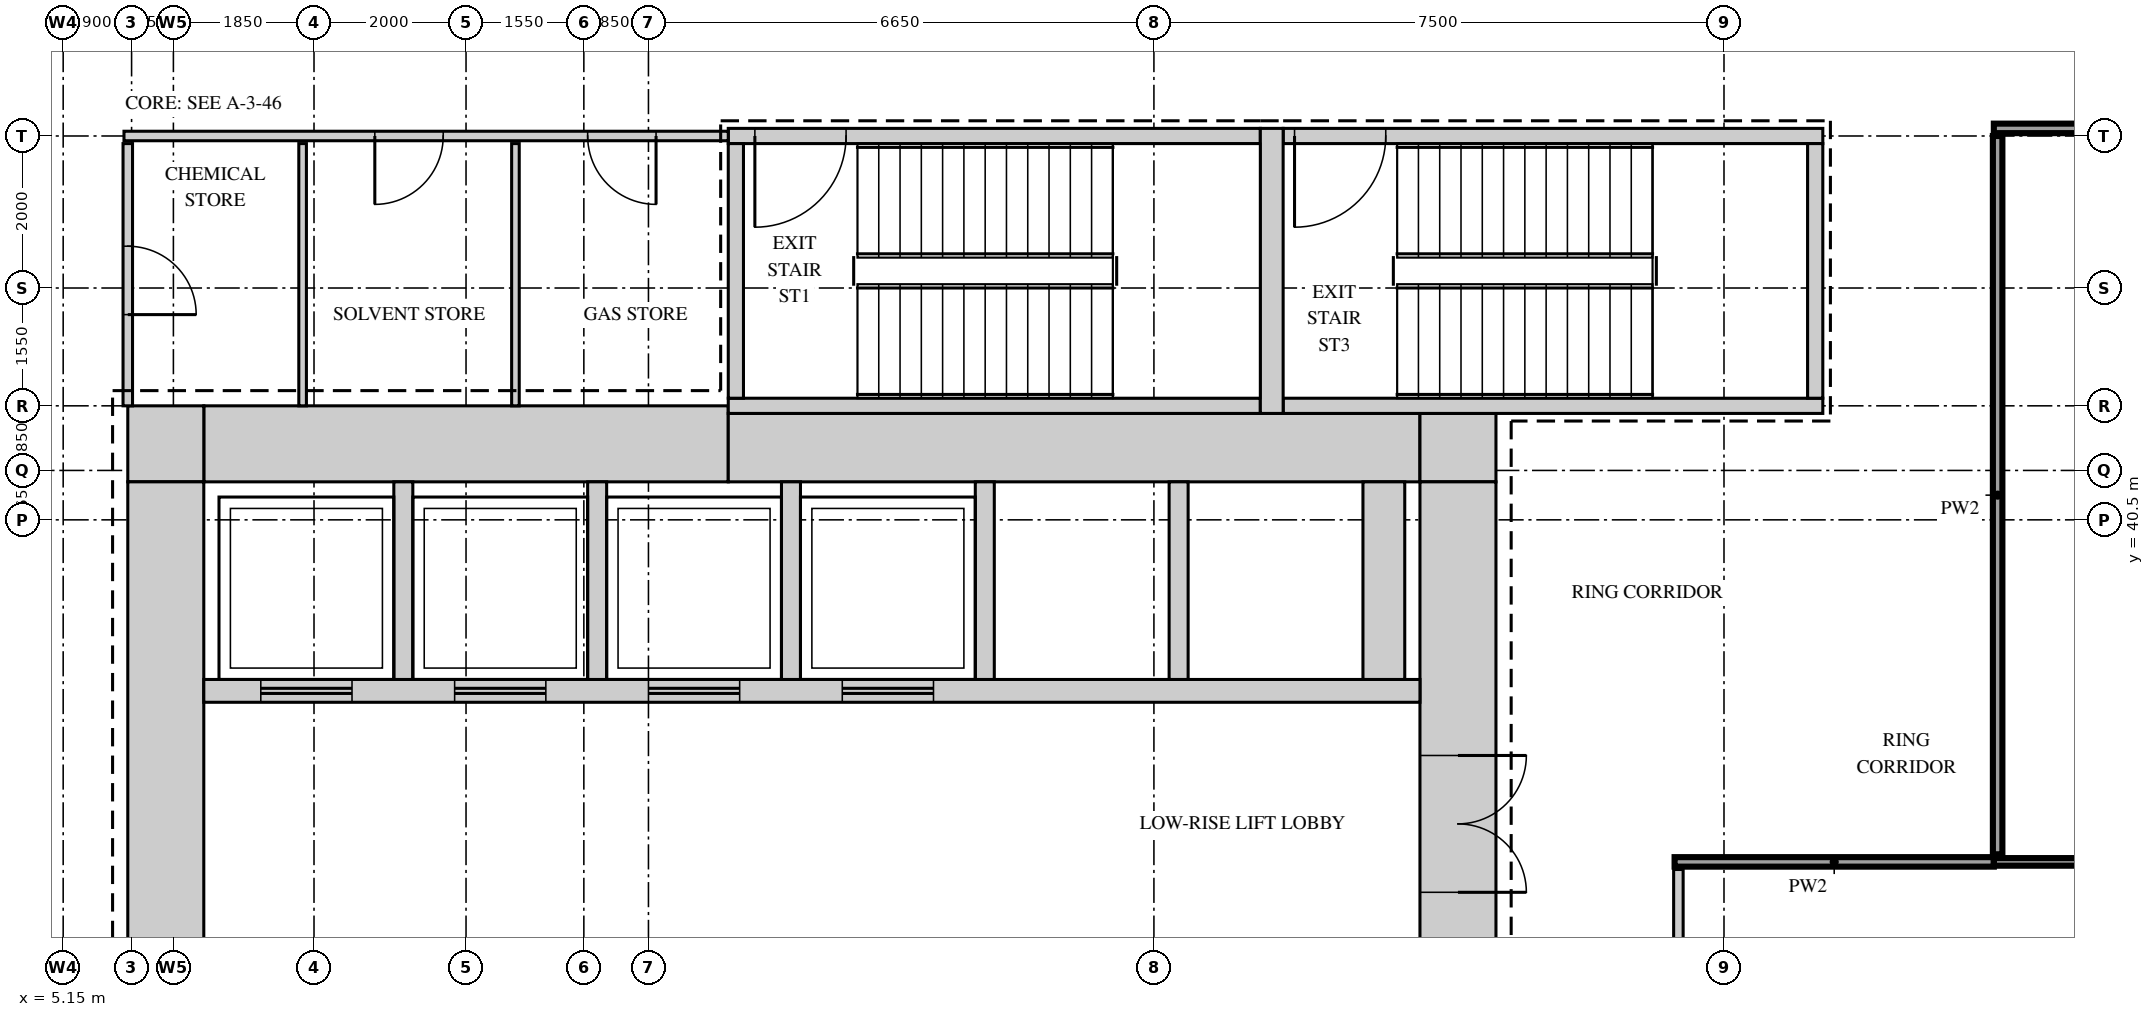
"""IFC4 building model, lengths in metres.
Left out: names, types, materials, properties, quantities, classifications, styles, units other than length and angle.
Written with IfcOpenShell. Run it as: python <this file> out.ifc"""

import sys

from ifc_helpers import new_model, si_unit, direction, frame, frame_2d, origin, place, context, subcontext, project, spatial, rectangle, extrude, source, transform, mapped, element, fill, save


model = new_model("IFC4")
c1 = context("Model", 3, precision=1e-05, world=origin(), true_north=direction((0.0, 1.0)))
c2 = subcontext(c1, "Body", "Model", "MODEL_VIEW")
j1 = project(units=[si_unit("LENGTHUNIT", "METRE"), si_unit("PLANEANGLEUNIT", "RADIAN")], contexts=[c1])
p1 = place(None, origin())
s1 = spatial("IfcSite", under=j1, at=p1, CompositionType="ELEMENT")
p2 = place(p1, origin())
s2 = spatial("IfcBuilding", under=s1, at=p2, CompositionType="ELEMENT")
p3 = place(p2, frame((0.0, 0.0, 145.5)))
s3 = spatial("IfcBuildingStorey", under=s2, at=p3, CompositionType="ELEMENT", Elevation=145.5)
m1 = source(origin(), c2, "Body", "SweptSolid", [
    extrude(rectangle(XDim=6.9, YDim=1.0, at=frame_2d((3.45, 0.0))), origin(), (0.0, 0.0, 1.0), 4.1),
])
p4 = place(p3, frame((7.0, 41.5, 0.0), z_axis=(0.0, 0.0, 1.0), x_axis=(1.0, 0.0, 0.0)))
e1 = element("IfcWall", 1, at=p4, inside=s3, PredefinedType="SHEAR", context=c2, shape_type="MappedRepresentation", body=[
    mapped(m1, transform((0.0, 0.0, 0.0))),
])
m2 = source(origin(), c2, "Body", "SweptSolid", [
    extrude(rectangle(XDim=9.1, YDim=0.9, at=frame_2d((4.55, 0.0))), origin(), (0.0, 0.0, 1.0), 4.1),
])
p5 = place(p3, frame((13.9, 41.45, 0.0), z_axis=(0.0, 0.0, 1.0), x_axis=(1.0, 0.0, 0.0)))
e2 = element("IfcWall", 2, at=p5, inside=s3, PredefinedType="SHEAR", context=c2, shape_type="MappedRepresentation", body=[
    mapped(m2, transform((0.0, 0.0, 0.0))),
])
m3 = source(origin(), c2, "Body", "SweptSolid", [
    extrude(rectangle(XDim=1.0, YDim=0.9, at=frame_2d((0.5, 0.0))), origin(), (0.0, 0.0, 1.0), 4.1),
])
p6 = place(p3, frame((23.0, 41.45, 0.0), z_axis=(0.0, 0.0, 1.0), x_axis=(1.0, 0.0, 0.0)))
e3 = element("IfcWall", 3, at=p6, inside=s3, PredefinedType="SHEAR", context=c2, shape_type="MappedRepresentation", body=[
    mapped(m3, transform((0.0, 0.0, 0.0))),
])
m4 = source(origin(), c2, "Body", "SweptSolid", [
    extrude(rectangle(XDim=1.0, YDim=1.0, at=frame_2d((0.5, 0.0))), origin(), (0.0, 0.0, 1.0), 4.1),
])
p7 = place(p3, frame((6.0, 41.5, 0.0), z_axis=(0.0, 0.0, 1.0), x_axis=(1.0, 0.0, 0.0)))
e4 = element("IfcWall", 4, at=p7, inside=s3, PredefinedType="SHEAR", context=c2, shape_type="MappedRepresentation", body=[
    mapped(m4, transform((0.0, 0.0, 0.0))),
])
m5 = source(origin(), c2, "Body", "SweptSolid", [
    extrude(rectangle(XDim=28.0, YDim=1.0, at=frame_2d((14.0, 0.0))), origin(), (0.0, 0.0, 1.0), 4.1),
])
p8 = place(p3, frame((23.5, 13.0, 0.0), z_axis=(0.0, 0.0, 1.0), x_axis=(0.0, 1.0, 0.0)))
e5 = element("IfcWall", 5, at=p8, inside=s3, PredefinedType="SHEAR", context=c2, shape_type="MappedRepresentation", body=[
    mapped(m5, transform((0.0, 0.0, 0.0))),
])
m6 = source(origin(), c2, "Body", "SweptSolid", [
    extrude(rectangle(XDim=1.8, YDim=2.1, at=frame_2d((0.9, 1.05))), frame((0.0, 0.51, 0.0), z_axis=(0.0, -1.0, 0.0), x_axis=(1.0, 0.0, 0.0)), (0.0, 0.0, 1.0), 1.02),
])
p9 = place(p8, frame((22.6, 0.0, 0.0)))
e6 = element("IfcOpeningElement", 6, at=p9, cuts=e5, PredefinedType="OPENING", context=c2, shape_type="MappedRepresentation", body=[
    mapped(m6, transform((0.0, 0.0, 0.0))),
])
m7 = source(origin(), c2, "Body", "SweptSolid", [
    extrude(rectangle(XDim=1.2, YDim=2.1, at=frame_2d((0.6, 1.05))), frame((0.0, 0.51, 0.0), z_axis=(0.0, -1.0, 0.0), x_axis=(1.0, 0.0, 0.0)), (0.0, 0.0, 1.0), 1.02),
])
p10 = place(p8, frame((12.35, 0.0, 0.0)))
e7 = element("IfcOpeningElement", 7, at=p10, cuts=e5, PredefinedType="OPENING", context=c2, shape_type="MappedRepresentation", body=[
    mapped(m7, transform((0.0, 0.0, 0.0))),
])
m8 = source(origin(), c2, "Body", "SweptSolid", [
    extrude(rectangle(XDim=0.9, YDim=2.1, at=frame_2d((0.45, 1.05))), frame((0.0, 0.51, 0.0), z_axis=(0.0, -1.0, 0.0), x_axis=(1.0, 0.0, 0.0)), (0.0, 0.0, 1.0), 1.02),
])
p11 = place(p8, frame((4.6, 0.0, 0.0)))
e8 = element("IfcOpeningElement", 8, at=p11, cuts=e5, PredefinedType="OPENING", context=c2, shape_type="MappedRepresentation", body=[
    mapped(m8, transform((0.0, 0.0, 0.0))),
])
p12 = place(p3, frame((6.5, 13.0, 0.0), z_axis=(0.0, 0.0, 1.0), x_axis=(0.0, 1.0, 0.0)))
e9 = element("IfcWall", 9, at=p12, inside=s3, PredefinedType="SHEAR", context=c2, shape_type="MappedRepresentation", body=[
    mapped(m5, transform((0.0, 0.0, 0.0))),
])
m9 = source(origin(), c2, "Body", "SweptSolid", [
    extrude(rectangle(XDim=7.0, YDim=0.2, at=frame_2d((3.5, 0.0))), origin(), (0.0, 0.0, 1.0), 4.1),
])
p13 = place(p3, frame((13.9, 45.55, 0.0), z_axis=(0.0, 0.0, 1.0), x_axis=(1.0, 0.0, 0.0)))
e10 = element("IfcWall", 10, at=p13, inside=s3, PredefinedType="SHEAR", context=c2, shape_type="MappedRepresentation", body=[
    mapped(m9, transform((0.0, 0.0, 0.0))),
])
m10 = source(origin(), c2, "Body", "SweptSolid", [
    extrude(rectangle(XDim=1.2, YDim=2.1, at=frame_2d((0.6, 1.05))), frame((0.0, 0.11, 0.0), z_axis=(0.0, -1.0, 0.0), x_axis=(1.0, 0.0, 0.0)), (0.0, 0.0, 1.0), 0.22),
])
p14 = place(p13, frame((0.35, 0.0, 0.0)))
e11 = element("IfcOpeningElement", 11, at=p14, cuts=e10, PredefinedType="OPENING", context=c2, shape_type="MappedRepresentation", body=[
    mapped(m10, transform((0.0, 0.0, 0.0))),
])
p15 = place(p3, frame((13.9, 42.0, 0.0), z_axis=(0.0, 0.0, 1.0), x_axis=(1.0, 0.0, 0.0)))
e12 = element("IfcWall", 12, at=p15, inside=s3, PredefinedType="SHEAR", context=c2, shape_type="MappedRepresentation", body=[
    mapped(m9, transform((0.0, 0.0, 0.0))),
])
m11 = source(origin(), c2, "Body", "SweptSolid", [
    extrude(rectangle(XDim=7.1, YDim=0.2, at=frame_2d((3.55, 0.0))), origin(), (0.0, 0.0, 1.0), 4.1),
])
p16 = place(p3, frame((21.2, 45.55, 0.0), z_axis=(0.0, 0.0, 1.0), x_axis=(1.0, 0.0, 0.0)))
e13 = element("IfcWall", 13, at=p16, inside=s3, PredefinedType="SHEAR", context=c2, shape_type="MappedRepresentation", body=[
    mapped(m11, transform((0.0, 0.0, 0.0))),
])
p17 = place(p16, frame((0.15, 0.0, 0.0)))
e14 = element("IfcOpeningElement", 14, at=p17, cuts=e13, PredefinedType="OPENING", context=c2, shape_type="MappedRepresentation", body=[
    mapped(m10, transform((0.0, 0.0, 0.0))),
])
p18 = place(p3, frame((21.2, 42.0, 0.0), z_axis=(0.0, 0.0, 1.0), x_axis=(1.0, 0.0, 0.0)))
e15 = element("IfcWall", 15, at=p18, inside=s3, PredefinedType="SHEAR", context=c2, shape_type="MappedRepresentation", body=[
    mapped(m11, transform((0.0, 0.0, 0.0))),
])
m12 = source(origin(), c2, "Body", "SweptSolid", [
    extrude(rectangle(XDim=3.75, YDim=0.3, at=frame_2d((1.875, 0.0))), origin(), (0.0, 0.0, 1.0), 4.1),
])
p19 = place(p3, frame((21.05, 41.9, 0.0), z_axis=(0.0, 0.0, 1.0), x_axis=(0.0, 1.0, 0.0)))
e16 = element("IfcWall", 16, at=p19, inside=s3, PredefinedType="SHEAR", context=c2, shape_type="MappedRepresentation", body=[
    mapped(m12, transform((0.0, 0.0, 0.0))),
])
m13 = source(origin(), c2, "Body", "SweptSolid", [
    extrude(rectangle(XDim=3.35, YDim=0.2, at=frame_2d((1.675, 0.0))), origin(), (0.0, 0.0, 1.0), 4.1),
])
for number, where, z_axis, x_axis in (
    (17, (14.0, 42.1, 0.0), (0.0, 0.0, 1.0), (0.0, 1.0, 0.0)),
    (18, (28.2, 42.1, 0.0), (0.0, 0.0, 1.0), (0.0, 1.0, 0.0)),
):
    element("IfcWall", number, at=place(p3, frame(where, z_axis=z_axis, x_axis=x_axis)), inside=s3, PredefinedType="SHEAR", context=c2, shape_type="MappedRepresentation", body=[
        mapped(m13, transform((0.0, 0.0, 0.0))),
    ])
m14 = source(origin(), c2, "Body", "SweptSolid", [
    extrude(rectangle(XDim=16.0, YDim=0.3, at=frame_2d((8.0, 0.0))), origin(), (0.0, 0.0, 1.0), 4.1),
])
p20 = place(p3, frame((7.0, 38.25, 0.0), z_axis=(0.0, 0.0, 1.0), x_axis=(1.0, 0.0, 0.0)))
e19 = element("IfcWall", 19, at=p20, inside=s3, PredefinedType="STANDARD", context=c2, shape_type="MappedRepresentation", body=[
    mapped(m14, transform((0.0, 0.0, 0.0))),
])
m15 = source(origin(), c2, "Body", "SweptSolid", [
    extrude(rectangle(XDim=1.2, YDim=2.1, at=frame_2d((0.6, 1.05))), frame((0.0, 0.16, 0.0), z_axis=(0.0, -1.0, 0.0), x_axis=(1.0, 0.0, 0.0)), (0.0, 0.0, 1.0), 0.32),
])
p21 = place(p20, frame((0.75, 0.0, 0.0)))
e20 = element("IfcOpeningElement", 20, at=p21, cuts=e19, PredefinedType="OPENING", context=c2, shape_type="MappedRepresentation", body=[
    mapped(m15, transform((0.0, 0.0, 0.0))),
])
p22 = place(p20, frame((3.3, 0.0, 0.0)))
e21 = element("IfcOpeningElement", 21, at=p22, cuts=e19, PredefinedType="OPENING", context=c2, shape_type="MappedRepresentation", body=[
    mapped(m15, transform((0.0, 0.0, 0.0))),
])
p23 = place(p20, frame((5.85, 0.0, 0.0)))
e22 = element("IfcOpeningElement", 22, at=p23, cuts=e19, PredefinedType="OPENING", context=c2, shape_type="MappedRepresentation", body=[
    mapped(m15, transform((0.0, 0.0, 0.0))),
])
p24 = place(p20, frame((8.4, 0.0, 0.0)))
e23 = element("IfcOpeningElement", 23, at=p24, cuts=e19, PredefinedType="OPENING", context=c2, shape_type="MappedRepresentation", body=[
    mapped(m15, transform((0.0, 0.0, 0.0))),
])
m16 = source(origin(), c2, "Body", "SweptSolid", [
    extrude(rectangle(XDim=2.6, YDim=0.25, at=frame_2d((1.3, 0.0))), origin(), (0.0, 0.0, 1.0), 4.1),
])
for number, where, z_axis, x_axis in (
    (24, (9.625, 38.4, 0.0), (0.0, 0.0, 1.0), (0.0, 1.0, 0.0)),
    (25, (12.175, 38.4, 0.0), (0.0, 0.0, 1.0), (0.0, 1.0, 0.0)),
    (26, (14.725, 38.4, 0.0), (0.0, 0.0, 1.0), (0.0, 1.0, 0.0)),
    (27, (17.275, 38.4, 0.0), (0.0, 0.0, 1.0), (0.0, 1.0, 0.0)),
    (28, (19.825, 38.4, 0.0), (0.0, 0.0, 1.0), (0.0, 1.0, 0.0)),
):
    element("IfcWall", number, at=place(p3, frame(where, z_axis=z_axis, x_axis=x_axis)), inside=s3, PredefinedType="STANDARD", context=c2, shape_type="MappedRepresentation", body=[
        mapped(m16, transform((0.0, 0.0, 0.0))),
    ])
m17 = source(origin(), c2, "Body", "SweptSolid", [
    extrude(rectangle(XDim=2.6, YDim=0.55, at=frame_2d((1.3, 0.0))), origin(), (0.0, 0.0, 1.0), 4.1),
])
p25 = place(p3, frame((22.525, 38.4, 0.0), z_axis=(0.0, 0.0, 1.0), x_axis=(0.0, 1.0, 0.0)))
e29 = element("IfcWall", 29, at=p25, inside=s3, PredefinedType="STANDARD", context=c2, shape_type="MappedRepresentation", body=[
    mapped(m17, transform((0.0, 0.0, 0.0))),
])
m18 = source(origin(), c2, "Body", "SweptSolid", [
    extrude(rectangle(XDim=23.2, YDim=0.125, at=frame_2d((11.6, 0.0))), origin(), (0.0, 0.0, 1.0), 4.2),
])
p26 = place(p3, frame((26.4, 12.7, 0.0), z_axis=(0.0, 0.0, 1.0), x_axis=(0.0, 1.0, 0.0)))
e30 = element("IfcWall", 30, at=p26, inside=s3, PredefinedType="PARTITIONING", context=c2, shape_type="MappedRepresentation", body=[
    mapped(m18, transform((0.0, 0.0, 0.0))),
])
m19 = source(origin(), c2, "Body", "SweptSolid", [
    extrude(rectangle(XDim=0.9, YDim=2.1, at=frame_2d((0.45, 1.05))), frame((0.0, 0.073, 0.0), z_axis=(0.0, -1.0, 0.0), x_axis=(1.0, 0.0, 0.0)), (0.0, 0.0, 1.0), 0.145),
])
p27 = place(p26, frame((2.15, 0.0, 0.0)))
e31 = element("IfcOpeningElement", 31, at=p27, cuts=e30, PredefinedType="OPENING", context=c2, shape_type="MappedRepresentation", body=[
    mapped(m19, transform((0.0, 0.0, 0.0))),
])
m20 = source(origin(), c2, "Body", "SweptSolid", [
    extrude(rectangle(XDim=4.2, YDim=0.125, at=frame_2d((2.1, 0.0))), origin(), (0.0, 0.0, 1.0), 4.2),
])
p28 = place(p3, frame((26.35, 36.0, 0.0), z_axis=(0.0, 0.0, 1.0), x_axis=(1.0, 0.0, 0.0)))
e32 = element("IfcWall", 32, at=p28, inside=s3, PredefinedType="PARTITIONING", context=c2, shape_type="MappedRepresentation", body=[
    mapped(m20, transform((0.0, 0.0, 0.0))),
])
m21 = source(origin(), c2, "Body", "SweptSolid", [
    extrude(rectangle(XDim=13.35, YDim=0.1, at=frame_2d((6.675, 0.0))), origin(), (0.0, 0.0, 1.0), 4.2),
])
p29 = place(p3, frame((30.55, 36.0, 0.0), z_axis=(0.0, 0.0, 1.0), x_axis=(1.0, 0.0, 0.0)))
e33 = element("IfcWall", 33, at=p29, inside=s3, PredefinedType="PARTITIONING", context=c2, shape_type="MappedRepresentation", body=[
    mapped(m21, transform((0.0, 0.0, 0.0))),
])
m22 = source(origin(), c2, "Body", "SweptSolid", [
    extrude(rectangle(XDim=9.45, YDim=0.125, at=frame_2d((4.725, 0.0))), origin(), (0.0, 0.0, 1.0), 4.2),
])
p30 = place(p3, frame((30.6, 36.1, 0.0), z_axis=(0.0, 0.0, 1.0), x_axis=(0.0, 1.0, 0.0)))
e34 = element("IfcWall", 34, at=p30, inside=s3, PredefinedType="PARTITIONING", context=c2, shape_type="MappedRepresentation", body=[
    mapped(m22, transform((0.0, 0.0, 0.0))),
])
m23 = source(origin(), c2, "Body", "SweptSolid", [
    extrude(rectangle(XDim=3.45, YDim=0.125, at=frame_2d((1.725, 0.0))), origin(), (0.0, 0.0, 1.0), 4.2),
])
p31 = place(p3, frame((6.0, 42.0, 0.0), z_axis=(0.0, 0.0, 1.0), x_axis=(0.0, 1.0, 0.0)))
e35 = element("IfcWall", 35, at=p31, inside=s3, PredefinedType="PARTITIONING", context=c2, shape_type="MappedRepresentation", body=[
    mapped(m23, transform((0.0, 0.0, 0.0))),
])
p32 = place(p31, frame((1.2, 0.0, 0.0)))
e36 = element("IfcOpeningElement", 36, at=p32, cuts=e35, PredefinedType="OPENING", context=c2, shape_type="MappedRepresentation", body=[
    mapped(m19, transform((0.0, 0.0, 0.0))),
])
m24 = source(origin(), c2, "Body", "SweptSolid", [
    extrude(rectangle(XDim=3.45, YDim=0.1, at=frame_2d((1.725, 0.0))), origin(), (0.0, 0.0, 1.0), 4.2),
])
for number, where, z_axis, x_axis in (
    (37, (8.3, 42.0, 0.0), (0.0, 0.0, 1.0), (0.0, 1.0, 0.0)),
    (38, (11.1, 42.0, 0.0), (0.0, 0.0, 1.0), (0.0, 1.0, 0.0)),
):
    element("IfcWall", number, at=place(p3, frame(where, z_axis=z_axis, x_axis=x_axis)), inside=s3, PredefinedType="PARTITIONING", context=c2, shape_type="MappedRepresentation", body=[
        mapped(m24, transform((0.0, 0.0, 0.0))),
    ])
m25 = source(origin(), c2, "Body", "SweptSolid", [
    extrude(rectangle(XDim=7.95, YDim=0.125, at=frame_2d((3.975, 0.0))), origin(), (0.0, 0.0, 1.0), 4.2),
])
p33 = place(p3, frame((5.95, 45.55, 0.0), z_axis=(0.0, 0.0, 1.0), x_axis=(1.0, 0.0, 0.0)))
e39 = element("IfcWall", 39, at=p33, inside=s3, PredefinedType="PARTITIONING", context=c2, shape_type="MappedRepresentation", body=[
    mapped(m25, transform((0.0, 0.0, 0.0))),
])
p34 = place(p33, frame((3.3, 0.0, 0.0)))
e40 = element("IfcOpeningElement", 40, at=p34, cuts=e39, PredefinedType="OPENING", context=c2, shape_type="MappedRepresentation", body=[
    mapped(m19, transform((0.0, 0.0, 0.0))),
])
p35 = place(p33, frame((6.1, 0.0, 0.0)))
e41 = element("IfcOpeningElement", 41, at=p35, cuts=e39, PredefinedType="OPENING", context=c2, shape_type="MappedRepresentation", body=[
    mapped(m19, transform((0.0, 0.0, 0.0))),
])
m26 = source(origin(), c2, "Body", "SweptSolid", [
    extrude(rectangle(XDim=13.5, YDim=0.125, at=frame_2d((6.75, 0.0))), origin(), (0.0, 0.0, 1.0), 4.2),
])
p36 = place(p3, frame((30.55, 45.65, 0.0), z_axis=(0.0, 0.0, 1.0), x_axis=(1.0, 0.0, 0.0)))
e42 = element("IfcWall", 42, at=p36, inside=s3, PredefinedType="PARTITIONING", context=c2, shape_type="MappedRepresentation", body=[
    mapped(m26, transform((0.0, 0.0, 0.0))),
])
m27 = source(origin(), c2, "Body", "SweptSolid", [
    extrude(rectangle(XDim=1.8, YDim=2.1, at=frame_2d((0.9, 1.05))), frame((0.0, 0.45, 0.0), z_axis=(0.0, -1.0, 0.0), x_axis=(1.0, 0.0, 0.0)), (0.0, 0.0, 1.0), 0.9),
])
p37 = place(p9, origin())
e43 = element("IfcDoor", 43, at=p37, inside=s3, OperationType="DOUBLE_DOOR_SINGLE_SWING", PredefinedType="DOOR", context=c2, shape_type="MappedRepresentation", body=[
    mapped(m27, transform((0.0, 0.0, 0.0))),
])
fill(e6, e43)
m28 = source(origin(), c2, "Body", "SweptSolid", [
    extrude(rectangle(XDim=0.9, YDim=2.1, at=frame_2d((0.45, 1.05))), frame((0.0, 0.025, 0.0), z_axis=(0.0, -1.0, 0.0), x_axis=(1.0, 0.0, 0.0)), (0.0, 0.0, 1.0), 0.05),
])
p38 = place(p32, origin())
e44 = element("IfcDoor", 44, at=p38, inside=s3, OperationType="SINGLE_SWING_LEFT", PredefinedType="DOOR", context=c2, shape_type="MappedRepresentation", body=[
    mapped(m28, transform((0.0, 0.0, 0.0))),
])
fill(e36, e44)
p39 = place(p34, origin())
e45 = element("IfcDoor", 45, at=p39, inside=s3, OperationType="SINGLE_SWING_LEFT", PredefinedType="DOOR", context=c2, shape_type="MappedRepresentation", body=[
    mapped(m28, transform((0.0, 0.0, 0.0))),
])
fill(e40, e45)
p40 = place(p35, origin())
e46 = element("IfcDoor", 46, at=p40, inside=s3, OperationType="SINGLE_SWING_RIGHT", PredefinedType="DOOR", context=c2, shape_type="MappedRepresentation", body=[
    mapped(m28, transform((0.0, 0.0, 0.0))),
])
fill(e41, e46)
m29 = source(origin(), c2, "Body", "SweptSolid", [
    extrude(rectangle(XDim=1.2, YDim=2.1, at=frame_2d((0.6, 1.05))), frame((0.0, 0.025, 0.0), z_axis=(0.0, -1.0, 0.0), x_axis=(1.0, 0.0, 0.0)), (0.0, 0.0, 1.0), 0.05),
])
p41 = place(p14, origin())
e47 = element("IfcDoor", 47, at=p41, inside=s3, OperationType="SINGLE_SWING_LEFT", PredefinedType="DOOR", context=c2, shape_type="MappedRepresentation", body=[
    mapped(m29, transform((0.0, 0.0, 0.0))),
])
fill(e11, e47)
p42 = place(p17, origin())
e48 = element("IfcDoor", 48, at=p42, inside=s3, OperationType="SINGLE_SWING_LEFT", PredefinedType="DOOR", context=c2, shape_type="MappedRepresentation", body=[
    mapped(m29, transform((0.0, 0.0, 0.0))),
])
fill(e14, e48)
p43 = place(p21, origin())
e49 = element("IfcDoor", 49, at=p43, inside=s3, OperationType="DOUBLE_DOOR_SLIDING", PredefinedType="DOOR", context=c2, shape_type="MappedRepresentation", body=[
    mapped(m29, transform((0.0, 0.0, 0.0))),
])
fill(e20, e49)
p44 = place(p22, origin())
e50 = element("IfcDoor", 50, at=p44, inside=s3, OperationType="DOUBLE_DOOR_SLIDING", PredefinedType="DOOR", context=c2, shape_type="MappedRepresentation", body=[
    mapped(m29, transform((0.0, 0.0, 0.0))),
])
fill(e21, e50)
p45 = place(p23, origin())
e51 = element("IfcDoor", 51, at=p45, inside=s3, OperationType="DOUBLE_DOOR_SLIDING", PredefinedType="DOOR", context=c2, shape_type="MappedRepresentation", body=[
    mapped(m29, transform((0.0, 0.0, 0.0))),
])
fill(e22, e51)
p46 = place(p24, origin())
e52 = element("IfcDoor", 52, at=p46, inside=s3, OperationType="DOUBLE_DOOR_SLIDING", PredefinedType="DOOR", context=c2, shape_type="MappedRepresentation", body=[
    mapped(m29, transform((0.0, 0.0, 0.0))),
])
fill(e23, e52)
save(model, sys.argv[1])
